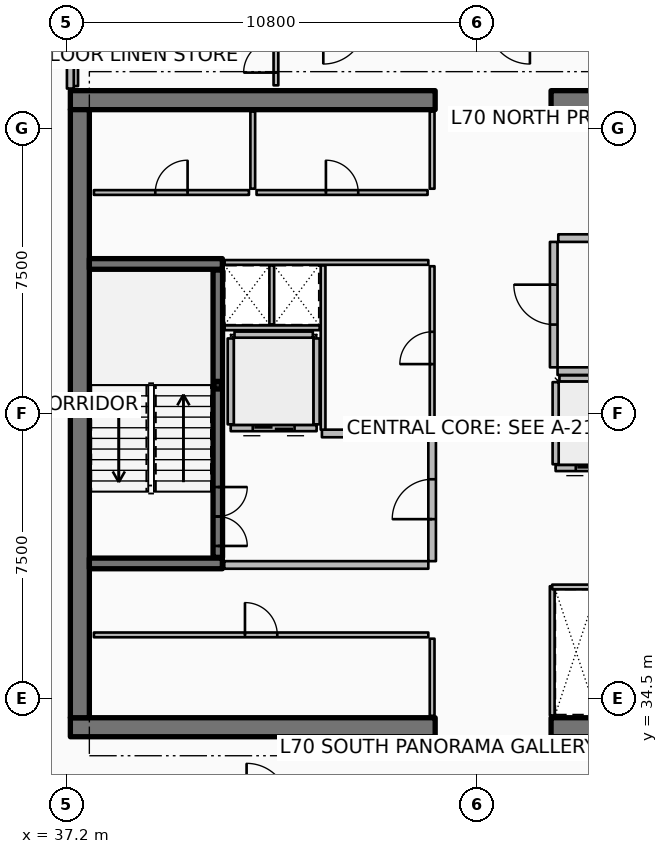
"""IFC4 building model, lengths in metres.
Left out: names, types, materials, properties, quantities, classifications, styles, units other than length and angle.
Written with IfcOpenShell. Run it as: python <this file> out.ifc"""

import sys

from ifc_helpers import new_model, si_unit, direction, frame, frame_2d, origin, origin_2d, place, context, subcontext, project, spatial, rectangle, hollow_rectangle, extrude, element, fill, save


model = new_model("IFC4")
c1 = context("Model", 3, precision=1e-05, world=origin(), true_north=direction((0.0, 1.0)))
c2 = subcontext(c1, "Body", "Model", "MODEL_VIEW")
j1 = project(units=[si_unit("LENGTHUNIT", "METRE"), si_unit("PLANEANGLEUNIT", "RADIAN")], contexts=[c1])
p1 = place(None, origin())
s1 = spatial("IfcSite", under=j1, at=p1, CompositionType="ELEMENT")
p2 = place(p1, origin())
s2 = spatial("IfcBuilding", under=s1, at=p2, CompositionType="ELEMENT")
p3 = place(p2, frame((0.0, 0.0, 279.05)))
s3 = spatial("IfcBuildingStorey", under=s2, at=p3, CompositionType="ELEMENT", Elevation=279.05)
p4 = place(p3, frame((37.3, 33.75, 0.0), z_axis=(0.0, 0.0, 1.0), x_axis=(1.0, 0.0, 0.0)))
e1 = element("IfcWall", 1, at=p4, inside=s3, PredefinedType="SHEAR", context=c2, shape_type="SweptSolid", body=[
    extrude(rectangle(XDim=9.6, YDim=0.5, at=frame_2d((4.8, 0.0))), origin(), (0.0, 0.0, 1.0), 3.85),
])
p5 = place(p3, frame((49.95, 33.75, 0.0), z_axis=(0.0, 0.0, 1.0), x_axis=(1.0, 0.0, 0.0)))
e2 = element("IfcWall", 2, at=p5, inside=s3, PredefinedType="SHEAR", context=c2, shape_type="SweptSolid", body=[
    extrude(rectangle(XDim=9.6, YDim=0.5, at=frame_2d((4.8, 0.0))), origin(), (0.0, 0.0, 1.0), 3.85),
])
p6 = place(p3, frame((37.3, 50.25, 0.0), z_axis=(0.0, 0.0, 1.0), x_axis=(1.0, 0.0, 0.0)))
e3 = element("IfcWall", 3, at=p6, inside=s3, PredefinedType="SHEAR", context=c2, shape_type="SweptSolid", body=[
    extrude(rectangle(XDim=9.6, YDim=0.5, at=frame_2d((4.8, 0.0))), origin(), (0.0, 0.0, 1.0), 3.85),
])
p7 = place(p3, frame((49.95, 50.25, 0.0), z_axis=(0.0, 0.0, 1.0), x_axis=(1.0, 0.0, 0.0)))
e4 = element("IfcWall", 4, at=p7, inside=s3, PredefinedType="SHEAR", context=c2, shape_type="SweptSolid", body=[
    extrude(rectangle(XDim=9.6, YDim=0.5, at=frame_2d((4.8, 0.0))), origin(), (0.0, 0.0, 1.0), 3.85),
])
p8 = place(p3, frame((37.55, 34.0, 0.0), z_axis=(0.0, 0.0, 1.0), x_axis=(0.0, 1.0, 0.0)))
e5 = element("IfcWall", 5, at=p8, inside=s3, PredefinedType="SHEAR", context=c2, shape_type="SweptSolid", body=[
    extrude(rectangle(XDim=16.0, YDim=0.5, at=frame_2d((8.0, 0.0))), origin(), (0.0, 0.0, 1.0), 3.85),
])
for number, where, z_axis, x_axis in (
    (6, (37.8, 38.06, 0.0), (0.0, 0.0, 1.0), (1.0, 0.0, 0.0)),
    (7, (37.8, 45.94, 0.0), (0.0, 0.0, 1.0), (1.0, 0.0, 0.0)),
):
    element("IfcWall", number, at=place(p3, frame(where, z_axis=z_axis, x_axis=x_axis)), inside=s3, PredefinedType="SHEAR", context=c2, shape_type="SweptSolid", body=[
        extrude(rectangle(XDim=3.5, YDim=0.28, at=frame_2d((1.75, 0.0))), origin(), (0.0, 0.0, 1.0), 3.85),
    ])
p9 = place(p3, frame((41.18, 42.75, 0.0), z_axis=(0.0, 0.0, 1.0), x_axis=(1.0, 0.0, 0.0)))
e8 = element("IfcColumn", 8, at=p9, inside=s3, PredefinedType="COLUMN", context=c2, shape_type="SweptSolid", body=[
    extrude(hollow_rectangle(XDim=0.2, YDim=0.2, WallThickness=0.01, InnerFilletRadius=0.01, OuterFilletRadius=0.02, at=origin_2d()), origin(), (0.0, 0.0, 1.0), 1.72),
])
p10 = place(p3, frame((41.18, 38.22, 0.0), z_axis=(0.0, 0.0, 1.0), x_axis=(0.0, 1.0, 0.0)))
e9 = element("IfcWall", 9, at=p10, inside=s3, PredefinedType="SOLIDWALL", context=c2, shape_type="SweptSolid", body=[
    extrude(rectangle(XDim=7.56, YDim=0.25, at=frame_2d((3.78, 0.0))), origin(), (0.0, 0.0, 1.0), 3.59),
])
p11 = place(p10, frame((0.3, 0.0, 0.0)))
e10 = element("IfcOpeningElement", 10, at=p11, cuts=e9, PredefinedType="OPENING", context=c2, shape_type="SweptSolid", body=[
    extrude(rectangle(XDim=1.55, YDim=2.15, at=frame_2d((0.775, 1.075))), frame((0.0, 0.135, 0.0), z_axis=(0.0, -1.0, 0.0), x_axis=(1.0, 0.0, 0.0)), (0.0, 0.0, 1.0), 0.27),
])
p12 = place(p3, frame((43.78, 41.62, 0.0), z_axis=(0.0, 0.0, 1.0), x_axis=(-1.0, 0.0, 0.0)))
e11 = element("IfcWall", 11, at=p12, inside=s3, PredefinedType="PARTITIONING", context=c2, shape_type="SweptSolid", body=[
    extrude(rectangle(XDim=2.26, YDim=0.16, at=frame_2d((1.13, 0.0))), origin(), (0.0, 0.0, 1.0), 3.59),
])
p13 = place(p12, frame((0.58, 0.0, 0.0)))
e12 = element("IfcOpeningElement", 12, at=p13, cuts=e11, PredefinedType="OPENING", context=c2, shape_type="SweptSolid", body=[
    extrude(rectangle(XDim=1.1, YDim=2.1, at=frame_2d((0.55, 1.05))), frame((0.0, 0.09, 0.0), z_axis=(0.0, -1.0, 0.0), x_axis=(1.0, 0.0, 0.0)), (0.0, 0.0, 1.0), 0.18),
])
for number, where, z_axis, x_axis in (
    (13, (43.78, 41.72, 0.0), (0.0, 0.0, 1.0), (0.0, 1.0, 0.0)),
    (14, (41.52, 41.72, 0.0), (0.0, 0.0, 1.0), (0.0, 1.0, 0.0)),
):
    element("IfcWall", number, at=place(p3, frame(where, z_axis=z_axis, x_axis=x_axis)), inside=s3, PredefinedType="PARTITIONING", context=c2, shape_type="SweptSolid", body=[
        extrude(rectangle(XDim=2.26, YDim=0.16, at=frame_2d((1.13, 0.0))), origin(), (0.0, 0.0, 1.0), 3.59),
    ])
p14 = place(p3, frame((41.62, 44.08, 0.0), z_axis=(0.0, 0.0, 1.0), x_axis=(1.0, 0.0, 0.0)))
e15 = element("IfcWall", 15, at=p14, inside=s3, PredefinedType="PARTITIONING", context=c2, shape_type="SweptSolid", body=[
    extrude(rectangle(XDim=2.06, YDim=0.16, at=frame_2d((1.03, 0.0))), origin(), (0.0, 0.0, 1.0), 3.59),
])
p15 = place(p3, frame((52.23, 40.57, 0.0), z_axis=(0.0, 0.0, 1.0), x_axis=(-1.0, 0.0, 0.0)))
e16 = element("IfcWall", 16, at=p15, inside=s3, PredefinedType="PARTITIONING", context=c2, shape_type="SweptSolid", body=[
    extrude(rectangle(XDim=2.16, YDim=0.16, at=frame_2d((1.08, 0.0))), origin(), (0.0, 0.0, 1.0), 3.59),
])
p16 = place(p15, frame((0.53, 0.0, 0.0)))
e17 = element("IfcOpeningElement", 17, at=p16, cuts=e16, PredefinedType="OPENING", context=c2, shape_type="SweptSolid", body=[
    extrude(rectangle(XDim=1.1, YDim=2.1, at=frame_2d((0.55, 1.05))), frame((0.0, 0.09, 0.0), z_axis=(0.0, -1.0, 0.0), x_axis=(1.0, 0.0, 0.0)), (0.0, 0.0, 1.0), 0.18),
])
p17 = place(p3, frame((50.07, 40.67, 0.0), z_axis=(0.0, 0.0, 1.0), x_axis=(0.0, 1.0, 0.0)))
e18 = element("IfcWall", 18, at=p17, inside=s3, PredefinedType="PARTITIONING", context=c2, shape_type="SweptSolid", body=[
    extrude(rectangle(XDim=2.16, YDim=0.16, at=frame_2d((1.08, 0.0))), origin(), (0.0, 0.0, 1.0), 3.59),
])
p18 = place(p3, frame((50.17, 42.93, 0.0), z_axis=(0.0, 0.0, 1.0), x_axis=(1.0, 0.0, 0.0)))
e19 = element("IfcWall", 19, at=p18, inside=s3, PredefinedType="PARTITIONING", context=c2, shape_type="SweptSolid", body=[
    extrude(rectangle(XDim=1.96, YDim=0.16, at=frame_2d((0.98, 0.0))), origin(), (0.0, 0.0, 1.0), 3.59),
])
p19 = place(p3, frame((46.82, 34.05, 0.0), z_axis=(0.0, 0.0, 1.0), x_axis=(0.0, 1.0, 0.0)))
e20 = element("IfcWall", 20, at=p19, inside=s3, PredefinedType="PARTITIONING", context=c2, shape_type="SweptSolid", body=[
    extrude(rectangle(XDim=2.03, YDim=0.125, at=frame_2d((1.015, 0.0))), origin(), (0.0, 0.0, 1.0), 3.03),
])
p20 = place(p3, frame((37.92, 36.18, 0.0), z_axis=(0.0, 0.0, 1.0), x_axis=(1.0, 0.0, 0.0)))
e21 = element("IfcWall", 21, at=p20, inside=s3, PredefinedType="PARTITIONING", context=c2, shape_type="SweptSolid", body=[
    extrude(rectangle(XDim=8.8, YDim=0.125, at=frame_2d((4.4, 0.0))), origin(), (0.0, 0.0, 1.0), 3.03),
])
p21 = place(p20, frame((3.975, 0.0, 0.0)))
e22 = element("IfcOpeningElement", 22, at=p21, cuts=e21, PredefinedType="OPENING", context=c2, shape_type="SweptSolid", body=[
    extrude(rectangle(XDim=0.85, YDim=2.06, at=frame_2d((0.425, 1.03))), frame((0.0, 0.073, 0.0), z_axis=(0.0, -1.0, 0.0), x_axis=(1.0, 0.0, 0.0)), (0.0, 0.0, 1.0), 0.145),
])
for number, where, z_axis, x_axis in (
    (23, (46.82, 47.92, 0.0), (0.0, 0.0, 1.0), (0.0, 1.0, 0.0)),
    (24, (42.1, 47.92, 0.0), (0.0, 0.0, 1.0), (0.0, 1.0, 0.0)),
):
    element("IfcWall", number, at=place(p3, frame(where, z_axis=z_axis, x_axis=x_axis)), inside=s3, PredefinedType="PARTITIONING", context=c2, shape_type="SweptSolid", body=[
        extrude(rectangle(XDim=2.03, YDim=0.125, at=frame_2d((1.015, 0.0))), origin(), (0.0, 0.0, 1.0), 3.03),
    ])
p22 = place(p3, frame((37.92, 47.82, 0.0), z_axis=(0.0, 0.0, 1.0), x_axis=(1.0, 0.0, 0.0)))
e25 = element("IfcWall", 25, at=p22, inside=s3, PredefinedType="PARTITIONING", context=c2, shape_type="SweptSolid", body=[
    extrude(rectangle(XDim=4.08, YDim=0.125, at=frame_2d((2.04, 0.0))), origin(), (0.0, 0.0, 1.0), 3.03),
])
p23 = place(p22, frame((1.615, 0.0, 0.0)))
e26 = element("IfcOpeningElement", 26, at=p23, cuts=e25, PredefinedType="OPENING", context=c2, shape_type="SweptSolid", body=[
    extrude(rectangle(XDim=0.85, YDim=2.06, at=frame_2d((0.425, 1.03))), frame((0.0, 0.073, 0.0), z_axis=(0.0, -1.0, 0.0), x_axis=(1.0, 0.0, 0.0)), (0.0, 0.0, 1.0), 0.145),
])
p24 = place(p3, frame((42.2, 47.82, 0.0), z_axis=(0.0, 0.0, 1.0), x_axis=(1.0, 0.0, 0.0)))
e27 = element("IfcWall", 27, at=p24, inside=s3, PredefinedType="PARTITIONING", context=c2, shape_type="SweptSolid", body=[
    extrude(rectangle(XDim=4.5, YDim=0.125, at=frame_2d((2.25, 0.0))), origin(), (0.0, 0.0, 1.0), 3.03),
])
p25 = place(p24, frame((1.825, 0.0, 0.0)))
e28 = element("IfcOpeningElement", 28, at=p25, cuts=e27, PredefinedType="OPENING", context=c2, shape_type="SweptSolid", body=[
    extrude(rectangle(XDim=0.85, YDim=2.06, at=frame_2d((0.425, 1.03))), frame((0.0, 0.073, 0.0), z_axis=(0.0, -1.0, 0.0), x_axis=(1.0, 0.0, 0.0)), (0.0, 0.0, 1.0), 0.145),
])
p26 = place(p3, frame((41.35, 38.02, 0.0), z_axis=(0.0, 0.0, 1.0), x_axis=(1.0, 0.0, 0.0)))
e29 = element("IfcWall", 29, at=p26, inside=s3, PredefinedType="PARTITIONING", context=c2, shape_type="SweptSolid", body=[
    extrude(rectangle(XDim=5.37, YDim=0.2, at=frame_2d((2.685, 0.0))), origin(), (0.0, 0.0, 1.0), 3.59),
])
p27 = place(p3, frame((43.92, 41.48, 0.0), z_axis=(0.0, 0.0, 1.0), x_axis=(1.0, 0.0, 0.0)))
e30 = element("IfcWall", 30, at=p27, inside=s3, PredefinedType="PARTITIONING", context=c2, shape_type="SweptSolid", body=[
    extrude(rectangle(XDim=2.8, YDim=0.2, at=frame_2d((1.4, 0.0))), origin(), (0.0, 0.0, 1.0), 3.59),
])
p28 = place(p3, frame((46.82, 38.12, 0.0), z_axis=(0.0, 0.0, 1.0), x_axis=(0.0, 1.0, 0.0)))
e31 = element("IfcWall", 31, at=p28, inside=s3, PredefinedType="PARTITIONING", context=c2, shape_type="SweptSolid", body=[
    extrude(rectangle(XDim=3.26, YDim=0.2, at=frame_2d((1.63, 0.0))), origin(), (0.0, 0.0, 1.0), 3.59),
])
p29 = place(p28, frame((1.105, 0.0, 0.0)))
e32 = element("IfcOpeningElement", 32, at=p29, cuts=e31, PredefinedType="OPENING", context=c2, shape_type="SweptSolid", body=[
    extrude(rectangle(XDim=1.05, YDim=2.1, at=frame_2d((0.525, 1.05))), frame((0.0, 0.11, 0.0), z_axis=(0.0, -1.0, 0.0), x_axis=(1.0, 0.0, 0.0)), (0.0, 0.0, 1.0), 0.22),
])
p30 = place(p3, frame((50.12, 43.12, 0.0), z_axis=(0.0, 0.0, 1.0), x_axis=(1.0, 0.0, 0.0)))
e33 = element("IfcWall", 33, at=p30, inside=s3, PredefinedType="PARTITIONING", context=c2, shape_type="SweptSolid", body=[
    extrude(rectangle(XDim=8.88, YDim=0.2, at=frame_2d((4.44, 0.0))), origin(), (0.0, 0.0, 1.0), 3.59),
])
p31 = place(p3, frame((50.14, 46.62, 0.0), z_axis=(0.0, 0.0, 1.0), x_axis=(1.0, 0.0, 0.0)))
e34 = element("IfcWall", 34, at=p31, inside=s3, PredefinedType="PARTITIONING", context=c2, shape_type="SweptSolid", body=[
    extrude(rectangle(XDim=1.02, YDim=0.2, at=frame_2d((0.51, 0.0))), origin(), (0.0, 0.0, 1.0), 3.59),
])
p32 = place(p3, frame((50.02, 43.22, 0.0), z_axis=(0.0, 0.0, 1.0), x_axis=(0.0, 1.0, 0.0)))
e35 = element("IfcWall", 35, at=p32, inside=s3, PredefinedType="PARTITIONING", context=c2, shape_type="SweptSolid", body=[
    extrude(rectangle(XDim=3.3, YDim=0.2, at=frame_2d((1.65, 0.0))), origin(), (0.0, 0.0, 1.0), 3.59),
])
p33 = place(p32, frame((1.125, 0.0, 0.0)))
e36 = element("IfcOpeningElement", 36, at=p33, cuts=e35, PredefinedType="OPENING", context=c2, shape_type="SweptSolid", body=[
    extrude(rectangle(XDim=1.05, YDim=2.1, at=frame_2d((0.525, 1.05))), frame((0.0, 0.11, 0.0), z_axis=(0.0, -1.0, 0.0), x_axis=(1.0, 0.0, 0.0)), (0.0, 0.0, 1.0), 0.22),
])
p34 = place(p3, frame((41.36, 45.98, 0.0), z_axis=(0.0, 0.0, 1.0), x_axis=(1.0, 0.0, 0.0)))
e37 = element("IfcWall", 37, at=p34, inside=s3, PredefinedType="PARTITIONING", context=c2, shape_type="SweptSolid", body=[
    extrude(rectangle(XDim=5.36, YDim=0.125, at=frame_2d((2.68, 0.0))), origin(), (0.0, 0.0, 1.0), 3.03),
])
p35 = place(p3, frame((41.36, 44.26, 0.0), z_axis=(0.0, 0.0, 1.0), x_axis=(1.0, 0.0, 0.0)))
e38 = element("IfcWall", 38, at=p35, inside=s3, PredefinedType="PARTITIONING", context=c2, shape_type="SweptSolid", body=[
    extrude(rectangle(XDim=2.5, YDim=0.125, at=frame_2d((1.25, 0.0))), origin(), (0.0, 0.0, 1.0), 3.03),
])
p36 = place(p3, frame((42.6, 44.35, 0.0), z_axis=(0.0, 0.0, 1.0), x_axis=(0.0, 1.0, 0.0)))
e39 = element("IfcWall", 39, at=p36, inside=s3, PredefinedType="PARTITIONING", context=c2, shape_type="SweptSolid", body=[
    extrude(rectangle(XDim=1.55, YDim=0.125, at=frame_2d((0.775, 0.0))), origin(), (0.0, 0.0, 1.0), 3.03),
])
p37 = place(p3, frame((49.98, 34.06, 0.0), z_axis=(0.0, 0.0, 1.0), x_axis=(0.0, 1.0, 0.0)))
e40 = element("IfcWall", 40, at=p37, inside=s3, PredefinedType="PARTITIONING", context=c2, shape_type="SweptSolid", body=[
    extrude(rectangle(XDim=3.4, YDim=0.125, at=frame_2d((1.7, 0.0))), origin(), (0.0, 0.0, 1.0), 3.03),
])
p38 = place(p3, frame((49.98, 37.44, 0.0), z_axis=(0.0, 0.0, 1.0), x_axis=(1.0, 0.0, 0.0)))
e41 = element("IfcWall", 41, at=p38, inside=s3, PredefinedType="PARTITIONING", context=c2, shape_type="SweptSolid", body=[
    extrude(rectangle(XDim=1.26, YDim=0.125, at=frame_2d((0.63, 0.0))), origin(), (0.0, 0.0, 1.0), 3.03),
])
p39 = place(p3, frame((43.95, 41.58, 0.0), z_axis=(0.0, 0.0, 1.0), x_axis=(0.0, 1.0, 0.0)))
e42 = element("IfcWall", 42, at=p39, inside=s3, PredefinedType="PARTITIONING", context=c2, shape_type="SweptSolid", body=[
    extrude(rectangle(XDim=4.32, YDim=0.125, at=frame_2d((2.16, 0.0))), origin(), (0.0, 0.0, 1.0), 3.03),
])
p40 = place(p3, frame((46.82, 41.58, 0.0), z_axis=(0.0, 0.0, 1.0), x_axis=(0.0, 1.0, 0.0)))
e43 = element("IfcWall", 43, at=p40, inside=s3, PredefinedType="PARTITIONING", context=c2, shape_type="SweptSolid", body=[
    extrude(rectangle(XDim=4.3, YDim=0.125, at=frame_2d((2.15, 0.0))), origin(), (0.0, 0.0, 1.0), 3.03),
])
p41 = place(p40, frame((1.725, 0.0, 0.0)))
e44 = element("IfcOpeningElement", 44, at=p41, cuts=e43, PredefinedType="OPENING", context=c2, shape_type="SweptSolid", body=[
    extrude(rectangle(XDim=0.85, YDim=2.06, at=frame_2d((0.425, 1.03))), frame((0.0, 0.073, 0.0), z_axis=(0.0, -1.0, 0.0), x_axis=(1.0, 0.0, 0.0)), (0.0, 0.0, 1.0), 0.145),
])
p42 = place(p3, frame((37.44, 50.62, 0.0), z_axis=(0.0, 0.0, 1.0), x_axis=(0.0, 1.0, 0.0)))
e45 = element("IfcWall", 45, at=p42, inside=s3, PredefinedType="PARTITIONING", context=c2, shape_type="SweptSolid", body=[
    extrude(rectangle(XDim=1.54, YDim=0.125, at=frame_2d((0.77, 0.0))), origin(), (0.0, 0.0, 1.0), 3.03),
])
p43 = place(p3, frame((42.71, 50.64, 0.0), z_axis=(0.0, 0.0, 1.0), x_axis=(0.0, 1.0, 0.0)))
e46 = element("IfcWall", 46, at=p43, inside=s3, PredefinedType="PARTITIONING", context=c2, shape_type="SweptSolid", body=[
    extrude(rectangle(XDim=1.52, YDim=0.125, at=frame_2d((0.76, 0.0))), origin(), (0.0, 0.0, 1.0), 2.957),
])
p44 = place(p43, frame((0.335, 0.0, 0.0)))
e47 = element("IfcOpeningElement", 47, at=p44, cuts=e46, PredefinedType="OPENING", context=c2, shape_type="SweptSolid", body=[
    extrude(rectangle(XDim=0.85, YDim=2.06, at=frame_2d((0.425, 1.03))), frame((0.0, 0.073, 0.0), z_axis=(0.0, -1.0, 0.0), x_axis=(1.0, 0.0, 0.0)), (0.0, 0.0, 1.0), 0.145),
])
p45 = place(p3, frame((37.3, 52.18, 0.0), z_axis=(0.0, 0.0, 1.0), x_axis=(0.0, -1.0, 0.0)))
e48 = element("IfcWall", 48, at=p45, inside=s3, PredefinedType="PARTITIONING", context=c2, shape_type="SweptSolid", body=[
    extrude(rectangle(XDim=1.625, YDim=0.18, at=frame_2d((0.812, 0.0))), origin(), (0.0, 0.0, 1.0), 2.957),
])
p46 = place(p11, origin())
e49 = element("IfcDoor", 49, at=p46, inside=s3, OperationType="DOUBLE_DOOR_SINGLE_SWING", PredefinedType="DOOR", context=c2, shape_type="SweptSolid", body=[
    extrude(rectangle(XDim=1.55, YDim=2.15, at=frame_2d((0.775, 1.075))), frame((0.0, 0.025, 0.0), z_axis=(0.0, -1.0, 0.0), x_axis=(1.0, 0.0, 0.0)), (0.0, 0.0, 1.0), 0.05),
])
fill(e10, e49)
p47 = place(p13, origin())
e50 = element("IfcDoor", 50, at=p47, inside=s3, OperationType="DOUBLE_DOOR_SLIDING", PredefinedType="DOOR", context=c2, shape_type="SweptSolid", body=[
    extrude(rectangle(XDim=1.1, YDim=2.1, at=frame_2d((0.55, 1.05))), frame((0.0, 0.025, 0.0), z_axis=(0.0, -1.0, 0.0), x_axis=(1.0, 0.0, 0.0)), (0.0, 0.0, 1.0), 0.05),
])
fill(e12, e50)
p48 = place(p16, origin())
e51 = element("IfcDoor", 51, at=p48, inside=s3, OperationType="DOUBLE_DOOR_SLIDING", PredefinedType="DOOR", context=c2, shape_type="SweptSolid", body=[
    extrude(rectangle(XDim=1.1, YDim=2.1, at=frame_2d((0.55, 1.05))), frame((0.0, 0.025, 0.0), z_axis=(0.0, -1.0, 0.0), x_axis=(1.0, 0.0, 0.0)), (0.0, 0.0, 1.0), 0.05),
])
fill(e17, e51)
p49 = place(p21, origin())
e52 = element("IfcDoor", 52, at=p49, inside=s3, OperationType="SINGLE_SWING_LEFT", PredefinedType="DOOR", context=c2, shape_type="SweptSolid", body=[
    extrude(rectangle(XDim=0.85, YDim=2.06, at=frame_2d((0.425, 1.03))), frame((0.0, 0.025, 0.0), z_axis=(0.0, -1.0, 0.0), x_axis=(1.0, 0.0, 0.0)), (0.0, 0.0, 1.0), 0.05),
])
fill(e22, e52)
p50 = place(p23, origin())
e53 = element("IfcDoor", 53, at=p50, inside=s3, OperationType="SINGLE_SWING_RIGHT", PredefinedType="DOOR", context=c2, shape_type="SweptSolid", body=[
    extrude(rectangle(XDim=0.85, YDim=2.06, at=frame_2d((0.425, 1.03))), frame((0.0, 0.025, 0.0), z_axis=(0.0, -1.0, 0.0), x_axis=(1.0, 0.0, 0.0)), (0.0, 0.0, 1.0), 0.05),
])
fill(e26, e53)
p51 = place(p25, origin())
e54 = element("IfcDoor", 54, at=p51, inside=s3, OperationType="SINGLE_SWING_LEFT", PredefinedType="DOOR", context=c2, shape_type="SweptSolid", body=[
    extrude(rectangle(XDim=0.85, YDim=2.06, at=frame_2d((0.425, 1.03))), frame((0.0, 0.025, 0.0), z_axis=(0.0, -1.0, 0.0), x_axis=(1.0, 0.0, 0.0)), (0.0, 0.0, 1.0), 0.05),
])
fill(e28, e54)
p52 = place(p29, origin())
e55 = element("IfcDoor", 55, at=p52, inside=s3, OperationType="SINGLE_SWING_LEFT", PredefinedType="DOOR", context=c2, shape_type="SweptSolid", body=[
    extrude(rectangle(XDim=1.05, YDim=2.1, at=frame_2d((0.525, 1.05))), frame((0.0, 0.025, 0.0), z_axis=(0.0, -1.0, 0.0), x_axis=(1.0, 0.0, 0.0)), (0.0, 0.0, 1.0), 0.05),
])
fill(e32, e55)
p53 = place(p33, origin())
e56 = element("IfcDoor", 56, at=p53, inside=s3, OperationType="SINGLE_SWING_RIGHT", PredefinedType="DOOR", context=c2, shape_type="SweptSolid", body=[
    extrude(rectangle(XDim=1.05, YDim=2.1, at=frame_2d((0.525, 1.05))), frame((0.0, 0.025, 0.0), z_axis=(0.0, -1.0, 0.0), x_axis=(1.0, 0.0, 0.0)), (0.0, 0.0, 1.0), 0.05),
])
fill(e36, e56)
p54 = place(p41, origin())
e57 = element("IfcDoor", 57, at=p54, inside=s3, OperationType="SINGLE_SWING_LEFT", PredefinedType="DOOR", context=c2, shape_type="SweptSolid", body=[
    extrude(rectangle(XDim=0.85, YDim=2.06, at=frame_2d((0.425, 1.03))), frame((0.0, 0.025, 0.0), z_axis=(0.0, -1.0, 0.0), x_axis=(1.0, 0.0, 0.0)), (0.0, 0.0, 1.0), 0.05),
])
fill(e44, e57)
p55 = place(p44, origin())
e58 = element("IfcDoor", 58, at=p55, inside=s3, OperationType="SINGLE_SWING_LEFT", PredefinedType="DOOR", context=c2, shape_type="SweptSolid", body=[
    extrude(rectangle(XDim=0.85, YDim=2.06, at=frame_2d((0.425, 1.03))), frame((0.0, 0.025, 0.0), z_axis=(0.0, -1.0, 0.0), x_axis=(1.0, 0.0, 0.0)), (0.0, 0.0, 1.0), 0.05),
])
fill(e47, e58)
save(model, sys.argv[1])
